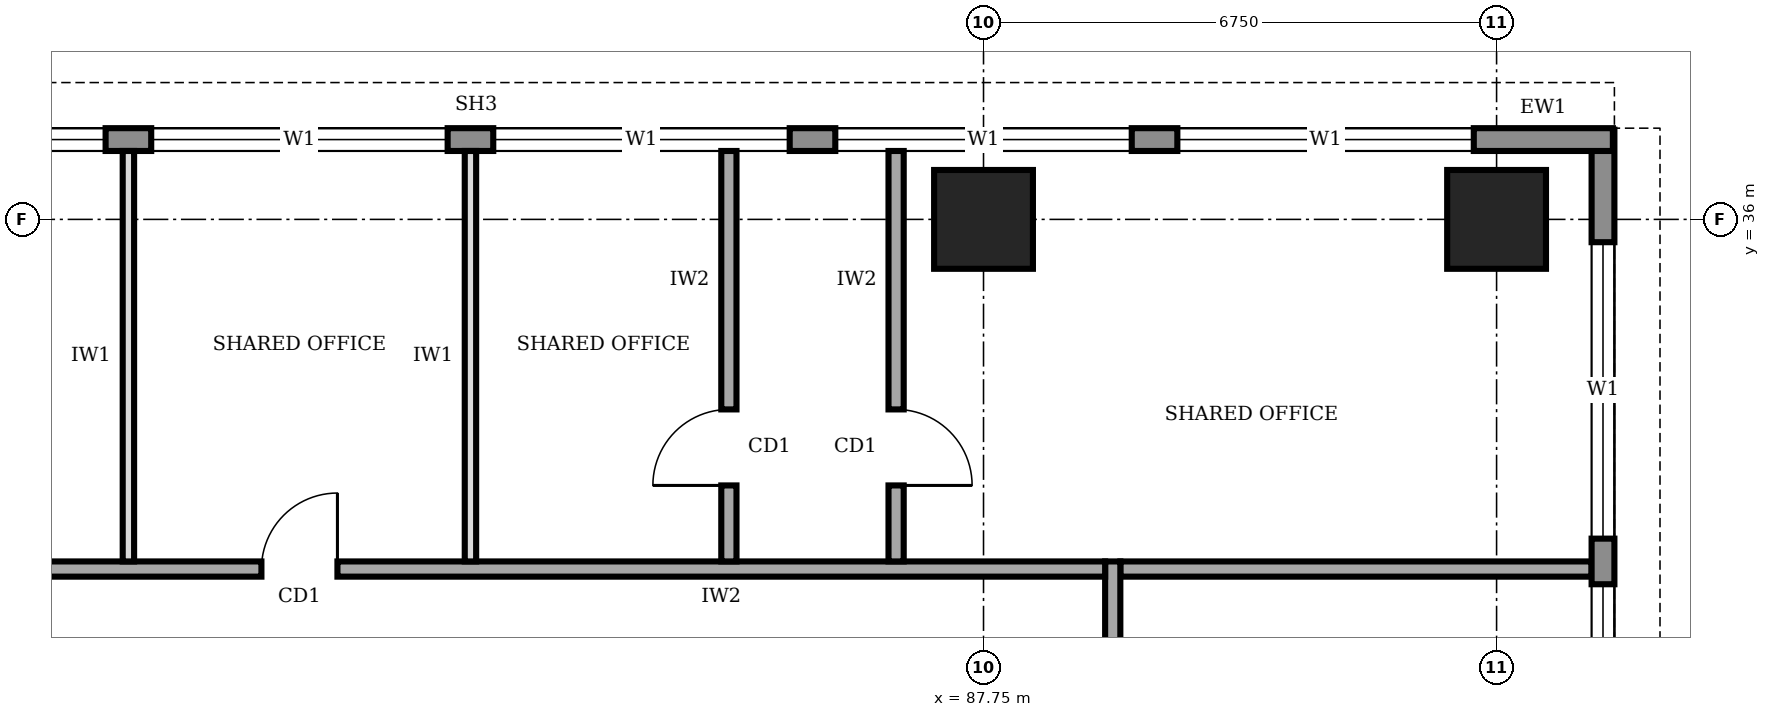
"""IFC4 building model, lengths in metres.
Left out: names, types, materials, properties, quantities, classifications, styles, units other than length and angle.
Written with IfcOpenShell. Run it as: python <this file> out.ifc"""

import sys

from ifc_helpers import new_model, si_unit, direction, frame, frame_2d, origin, origin_2d, place, context, subcontext, project, spatial, rectangle, extrude, element, fill, save


model = new_model("IFC4")
c1 = context("Model", 3, precision=1e-05, world=origin(), true_north=direction((0.0, 1.0)))
c2 = subcontext(c1, "Body", "Model", "MODEL_VIEW")
j1 = project(units=[si_unit("LENGTHUNIT", "METRE"), si_unit("PLANEANGLEUNIT", "RADIAN")], contexts=[c1])
p1 = place(None, origin())
s1 = spatial("IfcSite", under=j1, at=p1, CompositionType="ELEMENT")
p2 = place(p1, origin())
s2 = spatial("IfcBuilding", under=s1, at=p2, CompositionType="ELEMENT")
p3 = place(p2, frame((0.0, 0.0, 205.0)))
s3 = spatial("IfcBuildingStorey", under=s2, at=p3, CompositionType="ELEMENT", Elevation=205.0)
for number, where, z_axis, x_axis in (
    (1, (87.75, 36.0, 0.0), (0.0, 0.0, 1.0), (1.0, 0.0, 0.0)),
    (2, (94.5, 36.0, 0.0), (0.0, 0.0, 1.0), (1.0, 0.0, 0.0)),
):
    element("IfcColumn", number, at=place(p3, frame(where, z_axis=z_axis, x_axis=x_axis)), inside=s3, PredefinedType="COLUMN", context=c2, shape_type="SweptSolid", body=[
        extrude(rectangle(XDim=1.3, YDim=1.3, at=origin_2d()), origin(), (0.0, 0.0, 1.0), 4.0),
    ])
p4 = place(p3, frame((95.9, 3.32, 0.0), z_axis=(0.0, 0.0, 1.0), x_axis=(0.0, 1.0, 0.0)))
e3 = element("IfcWall", 3, at=p4, inside=s3, PredefinedType="STANDARD", context=c2, shape_type="SweptSolid", body=[
    extrude(rectangle(XDim=33.86, YDim=0.3, at=frame_2d((16.93, 0.0))), origin(), (0.0, 0.0, 1.0), 3.75),
])
p5 = place(p4, frame((1.48, 0.0, 0.9)))
e4 = element("IfcOpeningElement", 4, at=p5, cuts=e3, PredefinedType="OPENING", context=c2, shape_type="SweptSolid", body=[
    extrude(rectangle(XDim=3.9, YDim=2.2, at=frame_2d((1.95, 1.1))), frame((0.0, 0.16, 0.0), z_axis=(0.0, -1.0, 0.0), x_axis=(1.0, 0.0, 0.0)), (0.0, 0.0, 1.0), 0.32),
])
p6 = place(p4, frame((5.98, 0.0, 0.9)))
e5 = element("IfcOpeningElement", 5, at=p6, cuts=e3, PredefinedType="OPENING", context=c2, shape_type="SweptSolid", body=[
    extrude(rectangle(XDim=3.9, YDim=2.2, at=frame_2d((1.95, 1.1))), frame((0.0, 0.16, 0.0), z_axis=(0.0, -1.0, 0.0), x_axis=(1.0, 0.0, 0.0)), (0.0, 0.0, 1.0), 0.32),
])
p7 = place(p4, frame((10.48, 0.0, 0.9)))
e6 = element("IfcOpeningElement", 6, at=p7, cuts=e3, PredefinedType="OPENING", context=c2, shape_type="SweptSolid", body=[
    extrude(rectangle(XDim=3.9, YDim=2.2, at=frame_2d((1.95, 1.1))), frame((0.0, 0.16, 0.0), z_axis=(0.0, -1.0, 0.0), x_axis=(1.0, 0.0, 0.0)), (0.0, 0.0, 1.0), 0.32),
])
p8 = place(p4, frame((14.98, 0.0, 0.9)))
e7 = element("IfcOpeningElement", 7, at=p8, cuts=e3, PredefinedType="OPENING", context=c2, shape_type="SweptSolid", body=[
    extrude(rectangle(XDim=3.9, YDim=2.2, at=frame_2d((1.95, 1.1))), frame((0.0, 0.16, 0.0), z_axis=(0.0, -1.0, 0.0), x_axis=(1.0, 0.0, 0.0)), (0.0, 0.0, 1.0), 0.32),
])
p9 = place(p4, frame((19.48, 0.0, 0.9)))
e8 = element("IfcOpeningElement", 8, at=p9, cuts=e3, PredefinedType="OPENING", context=c2, shape_type="SweptSolid", body=[
    extrude(rectangle(XDim=3.9, YDim=2.2, at=frame_2d((1.95, 1.1))), frame((0.0, 0.16, 0.0), z_axis=(0.0, -1.0, 0.0), x_axis=(1.0, 0.0, 0.0)), (0.0, 0.0, 1.0), 0.32),
])
p10 = place(p4, frame((23.98, 0.0, 0.9)))
e9 = element("IfcOpeningElement", 9, at=p10, cuts=e3, PredefinedType="OPENING", context=c2, shape_type="SweptSolid", body=[
    extrude(rectangle(XDim=3.9, YDim=2.2, at=frame_2d((1.95, 1.1))), frame((0.0, 0.16, 0.0), z_axis=(0.0, -1.0, 0.0), x_axis=(1.0, 0.0, 0.0)), (0.0, 0.0, 1.0), 0.32),
])
p11 = place(p4, frame((28.48, 0.0, 0.9)))
e10 = element("IfcOpeningElement", 10, at=p11, cuts=e3, PredefinedType="OPENING", context=c2, shape_type="SweptSolid", body=[
    extrude(rectangle(XDim=3.9, YDim=2.2, at=frame_2d((1.95, 1.1))), frame((0.0, 0.16, 0.0), z_axis=(0.0, -1.0, 0.0), x_axis=(1.0, 0.0, 0.0)), (0.0, 0.0, 1.0), 0.32),
])
p12 = place(p3, frame((96.03, 37.05, 0.0), z_axis=(0.0, 0.0, 1.0), x_axis=(-1.0, 0.0, 0.0)))
e11 = element("IfcWall", 11, at=p12, inside=s3, PredefinedType="STANDARD", context=c2, shape_type="SweptSolid", body=[
    extrude(rectangle(XDim=29.91, YDim=0.3, at=frame_2d((14.955, 0.0))), origin(), (0.0, 0.0, 1.0), 3.75),
])
p13 = place(p12, frame((24.33, 0.0, 0.9)))
e12 = element("IfcOpeningElement", 12, at=p13, cuts=e11, PredefinedType="OPENING", context=c2, shape_type="SweptSolid", body=[
    extrude(rectangle(XDim=3.9, YDim=2.2, at=frame_2d((1.95, 1.1))), frame((0.0, 0.16, 0.0), z_axis=(0.0, -1.0, 0.0), x_axis=(1.0, 0.0, 0.0)), (0.0, 0.0, 1.0), 0.32),
])
p14 = place(p12, frame((19.83, 0.0, 0.9)))
e13 = element("IfcOpeningElement", 13, at=p14, cuts=e11, PredefinedType="OPENING", context=c2, shape_type="SweptSolid", body=[
    extrude(rectangle(XDim=3.9, YDim=2.2, at=frame_2d((1.95, 1.1))), frame((0.0, 0.16, 0.0), z_axis=(0.0, -1.0, 0.0), x_axis=(1.0, 0.0, 0.0)), (0.0, 0.0, 1.0), 0.32),
])
p15 = place(p12, frame((15.33, 0.0, 0.9)))
e14 = element("IfcOpeningElement", 14, at=p15, cuts=e11, PredefinedType="OPENING", context=c2, shape_type="SweptSolid", body=[
    extrude(rectangle(XDim=3.9, YDim=2.2, at=frame_2d((1.95, 1.1))), frame((0.0, 0.16, 0.0), z_axis=(0.0, -1.0, 0.0), x_axis=(1.0, 0.0, 0.0)), (0.0, 0.0, 1.0), 0.32),
])
p16 = place(p12, frame((10.83, 0.0, 0.9)))
e15 = element("IfcOpeningElement", 15, at=p16, cuts=e11, PredefinedType="OPENING", context=c2, shape_type="SweptSolid", body=[
    extrude(rectangle(XDim=3.9, YDim=2.2, at=frame_2d((1.95, 1.1))), frame((0.0, 0.16, 0.0), z_axis=(0.0, -1.0, 0.0), x_axis=(1.0, 0.0, 0.0)), (0.0, 0.0, 1.0), 0.32),
])
p17 = place(p12, frame((6.33, 0.0, 0.9)))
e16 = element("IfcOpeningElement", 16, at=p17, cuts=e11, PredefinedType="OPENING", context=c2, shape_type="SweptSolid", body=[
    extrude(rectangle(XDim=3.9, YDim=2.2, at=frame_2d((1.95, 1.1))), frame((0.0, 0.16, 0.0), z_axis=(0.0, -1.0, 0.0), x_axis=(1.0, 0.0, 0.0)), (0.0, 0.0, 1.0), 0.32),
])
p18 = place(p12, frame((1.83, 0.0, 0.9)))
e17 = element("IfcOpeningElement", 17, at=p18, cuts=e11, PredefinedType="OPENING", context=c2, shape_type="SweptSolid", body=[
    extrude(rectangle(XDim=3.9, YDim=2.2, at=frame_2d((1.95, 1.1))), frame((0.0, 0.16, 0.0), z_axis=(0.0, -1.0, 0.0), x_axis=(1.0, 0.0, 0.0)), (0.0, 0.0, 1.0), 0.32),
])
p19 = place(p3, frame((89.45, 7.7, 0.0), z_axis=(0.0, 0.0, 1.0), x_axis=(0.0, 1.0, 0.0)))
e18 = element("IfcWall", 18, at=p19, inside=s3, PredefinedType="SOLIDWALL", context=c2, shape_type="SweptSolid", body=[
    extrude(rectangle(XDim=23.8, YDim=0.2, at=frame_2d((11.9, 0.0))), origin(), (0.0, 0.0, 1.0), 3.75),
])
p20 = place(p19, frame((2.3, 0.0, 0.0)))
e19 = element("IfcOpeningElement", 19, at=p20, cuts=e18, PredefinedType="OPENING", context=c2, shape_type="SweptSolid", body=[
    extrude(rectangle(XDim=1.0, YDim=2.1, at=frame_2d((0.5, 1.05))), frame((0.0, 0.11, 0.0), z_axis=(0.0, -1.0, 0.0), x_axis=(1.0, 0.0, 0.0)), (0.0, 0.0, 1.0), 0.22),
])
p21 = place(p19, frame((6.55, 0.0, 0.0)))
e20 = element("IfcOpeningElement", 20, at=p21, cuts=e18, PredefinedType="OPENING", context=c2, shape_type="SweptSolid", body=[
    extrude(rectangle(XDim=0.9, YDim=2.1, at=frame_2d((0.45, 1.05))), frame((0.0, 0.11, 0.0), z_axis=(0.0, -1.0, 0.0), x_axis=(1.0, 0.0, 0.0)), (0.0, 0.0, 1.0), 0.22),
])
p22 = place(p19, frame((9.75, 0.0, 0.0)))
e21 = element("IfcOpeningElement", 21, at=p22, cuts=e18, PredefinedType="OPENING", context=c2, shape_type="SweptSolid", body=[
    extrude(rectangle(XDim=0.9, YDim=2.1, at=frame_2d((0.45, 1.05))), frame((0.0, 0.11, 0.0), z_axis=(0.0, -1.0, 0.0), x_axis=(1.0, 0.0, 0.0)), (0.0, 0.0, 1.0), 0.22),
])
p23 = place(p19, frame((15.3, 0.0, 0.0)))
e22 = element("IfcOpeningElement", 22, at=p23, cuts=e18, PredefinedType="OPENING", context=c2, shape_type="SweptSolid", body=[
    extrude(rectangle(XDim=0.9, YDim=2.1, at=frame_2d((0.45, 1.05))), frame((0.0, 0.11, 0.0), z_axis=(0.0, -1.0, 0.0), x_axis=(1.0, 0.0, 0.0)), (0.0, 0.0, 1.0), 0.22),
])
p24 = place(p19, frame((17.8, 0.0, 0.0)))
e23 = element("IfcOpeningElement", 23, at=p24, cuts=e18, PredefinedType="OPENING", context=c2, shape_type="SweptSolid", body=[
    extrude(rectangle(XDim=1.0, YDim=2.1, at=frame_2d((0.5, 1.05))), frame((0.0, 0.11, 0.0), z_axis=(0.0, -1.0, 0.0), x_axis=(1.0, 0.0, 0.0)), (0.0, 0.0, 1.0), 0.22),
])
p25 = place(p19, frame((12.7, 0.0, 0.0)))
e24 = element("IfcOpeningElement", 24, at=p25, cuts=e18, PredefinedType="OPENING", context=c2, shape_type="SweptSolid", body=[
    extrude(rectangle(XDim=1.0, YDim=2.1, at=frame_2d((0.5, 1.05))), frame((0.0, 0.11, 0.0), z_axis=(0.0, -1.0, 0.0), x_axis=(1.0, 0.0, 0.0)), (0.0, 0.0, 1.0), 0.22),
])
p26 = place(p19, frame((21.05, 0.0, 0.0)))
e25 = element("IfcOpeningElement", 25, at=p26, cuts=e18, PredefinedType="OPENING", context=c2, shape_type="SweptSolid", body=[
    extrude(rectangle(XDim=1.0, YDim=2.1, at=frame_2d((0.5, 1.05))), frame((0.0, 0.11, 0.0), z_axis=(0.0, -1.0, 0.0), x_axis=(1.0, 0.0, 0.0)), (0.0, 0.0, 1.0), 0.22),
])
p27 = place(p3, frame((89.35, 31.4, 0.0), z_axis=(0.0, 0.0, 1.0), x_axis=(-1.0, 0.0, 0.0)))
e26 = element("IfcWall", 26, at=p27, inside=s3, PredefinedType="SOLIDWALL", context=c2, shape_type="SweptSolid", body=[
    extrude(rectangle(XDim=16.9, YDim=0.2, at=frame_2d((8.45, 0.0))), origin(), (0.0, 0.0, 1.0), 3.75),
])
p28 = place(p27, frame((14.375, 0.0, 0.0)))
e27 = element("IfcOpeningElement", 27, at=p28, cuts=e26, PredefinedType="OPENING", context=c2, shape_type="SweptSolid", body=[
    extrude(rectangle(XDim=1.0, YDim=2.1, at=frame_2d((0.5, 1.05))), frame((0.0, 0.11, 0.0), z_axis=(0.0, -1.0, 0.0), x_axis=(1.0, 0.0, 0.0)), (0.0, 0.0, 1.0), 0.22),
])
p29 = place(p27, frame((10.1, 0.0, 0.0)))
e28 = element("IfcOpeningElement", 28, at=p29, cuts=e26, PredefinedType="OPENING", context=c2, shape_type="SweptSolid", body=[
    extrude(rectangle(XDim=1.0, YDim=2.1, at=frame_2d((0.5, 1.05))), frame((0.0, 0.11, 0.0), z_axis=(0.0, -1.0, 0.0), x_axis=(1.0, 0.0, 0.0)), (0.0, 0.0, 1.0), 0.22),
])
p30 = place(p3, frame((84.4, 31.5, 0.0), z_axis=(0.0, 0.0, 1.0), x_axis=(0.0, 1.0, 0.0)))
e29 = element("IfcWall", 29, at=p30, inside=s3, PredefinedType="SOLIDWALL", context=c2, shape_type="SweptSolid", body=[
    extrude(rectangle(XDim=5.4, YDim=0.2, at=frame_2d((2.7, 0.0))), origin(), (0.0, 0.0, 1.0), 3.75),
])
p31 = place(p30, frame((1.0, 0.0, 0.0)))
e30 = element("IfcOpeningElement", 30, at=p31, cuts=e29, PredefinedType="OPENING", context=c2, shape_type="SweptSolid", body=[
    extrude(rectangle(XDim=1.0, YDim=2.1, at=frame_2d((0.5, 1.05))), frame((0.0, 0.11, 0.0), z_axis=(0.0, -1.0, 0.0), x_axis=(1.0, 0.0, 0.0)), (0.0, 0.0, 1.0), 0.22),
])
p32 = place(p3, frame((86.6, 36.9, 0.0), z_axis=(0.0, 0.0, 1.0), x_axis=(0.0, -1.0, 0.0)))
e31 = element("IfcWall", 31, at=p32, inside=s3, PredefinedType="SOLIDWALL", context=c2, shape_type="SweptSolid", body=[
    extrude(rectangle(XDim=5.4, YDim=0.2, at=frame_2d((2.7, 0.0))), origin(), (0.0, 0.0, 1.0), 3.75),
])
p33 = place(p32, frame((3.4, 0.0, 0.0)))
e32 = element("IfcOpeningElement", 32, at=p33, cuts=e31, PredefinedType="OPENING", context=c2, shape_type="SweptSolid", body=[
    extrude(rectangle(XDim=1.0, YDim=2.1, at=frame_2d((0.5, 1.05))), frame((0.0, 0.11, 0.0), z_axis=(0.0, -1.0, 0.0), x_axis=(1.0, 0.0, 0.0)), (0.0, 0.0, 1.0), 0.22),
])
p34 = place(p3, frame((89.55, 31.4, 0.0), z_axis=(0.0, 0.0, 1.0), x_axis=(1.0, 0.0, 0.0)))
e33 = element("IfcWall", 33, at=p34, inside=s3, PredefinedType="SOLIDWALL", context=c2, shape_type="SweptSolid", body=[
    extrude(rectangle(XDim=6.2, YDim=0.2, at=frame_2d((3.1, 0.0))), origin(), (0.0, 0.0, 1.0), 3.75),
])
for number, where, z_axis, x_axis in (
    (34, (76.5, 31.5, 0.0), (0.0, 0.0, 1.0), (0.0, 1.0, 0.0)),
    (35, (81.0, 31.5, 0.0), (0.0, 0.0, 1.0), (0.0, 1.0, 0.0)),
):
    element("IfcWall", number, at=place(p3, frame(where, z_axis=z_axis, x_axis=x_axis)), inside=s3, PredefinedType="PARTITIONING", context=c2, shape_type="SweptSolid", body=[
        extrude(rectangle(XDim=5.4, YDim=0.15, at=frame_2d((2.7, 0.0))), origin(), (0.0, 0.0, 1.0), 3.75),
    ])
p35 = place(p10, origin())
e36 = element("IfcWindow", 36, at=p35, inside=s3, PartitioningType="SINGLE_PANEL", PredefinedType="WINDOW", context=c2, shape_type="SweptSolid", body=[
    extrude(rectangle(XDim=3.9, YDim=2.2, at=frame_2d((1.95, 1.1))), frame((0.0, 0.03, 0.0), z_axis=(0.0, -1.0, 0.0), x_axis=(1.0, 0.0, 0.0)), (0.0, 0.0, 1.0), 0.06),
])
fill(e9, e36)
p36 = place(p11, origin())
e37 = element("IfcWindow", 37, at=p36, inside=s3, PartitioningType="SINGLE_PANEL", PredefinedType="WINDOW", context=c2, shape_type="SweptSolid", body=[
    extrude(rectangle(XDim=3.9, YDim=2.2, at=frame_2d((1.95, 1.1))), frame((0.0, 0.03, 0.0), z_axis=(0.0, -1.0, 0.0), x_axis=(1.0, 0.0, 0.0)), (0.0, 0.0, 1.0), 0.06),
])
fill(e10, e37)
p37 = place(p14, origin())
e38 = element("IfcWindow", 38, at=p37, inside=s3, PartitioningType="SINGLE_PANEL", PredefinedType="WINDOW", context=c2, shape_type="SweptSolid", body=[
    extrude(rectangle(XDim=3.9, YDim=2.2, at=frame_2d((1.95, 1.1))), frame((0.0, 0.03, 0.0), z_axis=(0.0, -1.0, 0.0), x_axis=(1.0, 0.0, 0.0)), (0.0, 0.0, 1.0), 0.06),
])
fill(e13, e38)
p38 = place(p15, origin())
e39 = element("IfcWindow", 39, at=p38, inside=s3, PartitioningType="SINGLE_PANEL", PredefinedType="WINDOW", context=c2, shape_type="SweptSolid", body=[
    extrude(rectangle(XDim=3.9, YDim=2.2, at=frame_2d((1.95, 1.1))), frame((0.0, 0.03, 0.0), z_axis=(0.0, -1.0, 0.0), x_axis=(1.0, 0.0, 0.0)), (0.0, 0.0, 1.0), 0.06),
])
fill(e14, e39)
p39 = place(p16, origin())
e40 = element("IfcWindow", 40, at=p39, inside=s3, PartitioningType="SINGLE_PANEL", PredefinedType="WINDOW", context=c2, shape_type="SweptSolid", body=[
    extrude(rectangle(XDim=3.9, YDim=2.2, at=frame_2d((1.95, 1.1))), frame((0.0, 0.03, 0.0), z_axis=(0.0, -1.0, 0.0), x_axis=(1.0, 0.0, 0.0)), (0.0, 0.0, 1.0), 0.06),
])
fill(e15, e40)
p40 = place(p17, origin())
e41 = element("IfcWindow", 41, at=p40, inside=s3, PartitioningType="SINGLE_PANEL", PredefinedType="WINDOW", context=c2, shape_type="SweptSolid", body=[
    extrude(rectangle(XDim=3.9, YDim=2.2, at=frame_2d((1.95, 1.1))), frame((0.0, 0.03, 0.0), z_axis=(0.0, -1.0, 0.0), x_axis=(1.0, 0.0, 0.0)), (0.0, 0.0, 1.0), 0.06),
])
fill(e16, e41)
p41 = place(p18, origin())
e42 = element("IfcWindow", 42, at=p41, inside=s3, PartitioningType="SINGLE_PANEL", PredefinedType="WINDOW", context=c2, shape_type="SweptSolid", body=[
    extrude(rectangle(XDim=3.9, YDim=2.2, at=frame_2d((1.95, 1.1))), frame((0.0, 0.03, 0.0), z_axis=(0.0, -1.0, 0.0), x_axis=(1.0, 0.0, 0.0)), (0.0, 0.0, 1.0), 0.06),
])
fill(e17, e42)
p42 = place(p29, frame((1.0, 0.0, 0.0), z_axis=(0.0, 0.0, 1.0), x_axis=(-1.0, 0.0, 0.0)))
e43 = element("IfcDoor", 43, at=p42, inside=s3, OperationType="SINGLE_SWING_RIGHT", PredefinedType="DOOR", context=c2, shape_type="SweptSolid", body=[
    extrude(rectangle(XDim=1.0, YDim=2.1, at=frame_2d((0.5, 1.05))), frame((0.0, 0.025, 0.0), z_axis=(0.0, -1.0, 0.0), x_axis=(1.0, 0.0, 0.0)), (0.0, 0.0, 1.0), 0.05),
])
fill(e28, e43)
p43 = place(p31, origin())
e44 = element("IfcDoor", 44, at=p43, inside=s3, OperationType="SINGLE_SWING_LEFT", PredefinedType="DOOR", context=c2, shape_type="SweptSolid", body=[
    extrude(rectangle(XDim=1.0, YDim=2.1, at=frame_2d((0.5, 1.05))), frame((0.0, 0.025, 0.0), z_axis=(0.0, -1.0, 0.0), x_axis=(1.0, 0.0, 0.0)), (0.0, 0.0, 1.0), 0.05),
])
fill(e30, e44)
p44 = place(p33, origin())
e45 = element("IfcDoor", 45, at=p44, inside=s3, OperationType="SINGLE_SWING_RIGHT", PredefinedType="DOOR", context=c2, shape_type="SweptSolid", body=[
    extrude(rectangle(XDim=1.0, YDim=2.1, at=frame_2d((0.5, 1.05))), frame((0.0, 0.025, 0.0), z_axis=(0.0, -1.0, 0.0), x_axis=(1.0, 0.0, 0.0)), (0.0, 0.0, 1.0), 0.05),
])
fill(e32, e45)
save(model, sys.argv[1])
